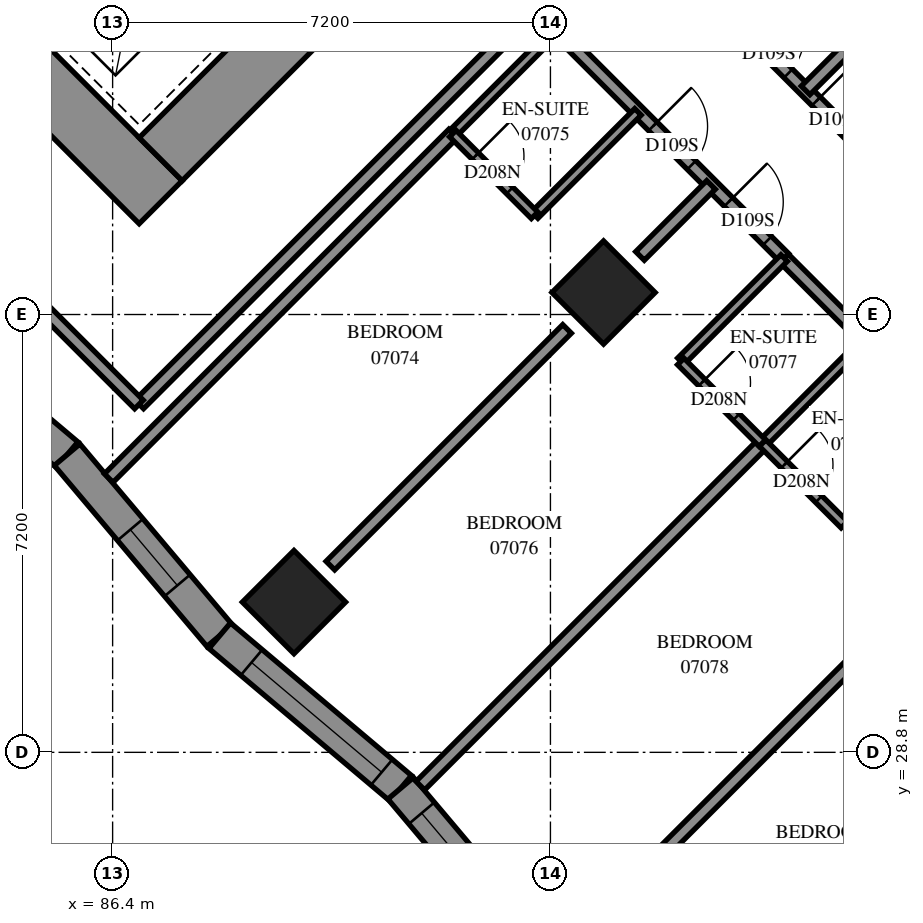
"""IFC4 building model, lengths in metres.
Left out: names, types, materials, properties, quantities, classifications, styles, units other than length and angle.
Written with IfcOpenShell. Run it as: python <this file> out.ifc"""

import sys

from ifc_helpers import new_model, si_unit, direction, frame, frame_2d, origin, origin_2d, place, context, subcontext, project, spatial, polyline, rectangle, outline, extrude, element, fill, save


model = new_model("IFC4")
c1 = context("Model", 3, precision=1e-05, world=origin(), true_north=direction((0.0, 1.0)))
c2 = subcontext(c1, "Body", "Model", "MODEL_VIEW")
j1 = project(units=[si_unit("LENGTHUNIT", "METRE"), si_unit("PLANEANGLEUNIT", "RADIAN")], contexts=[c1])
p1 = place(None, origin())
s1 = spatial("IfcSite", under=j1, at=p1, CompositionType="ELEMENT")
p2 = place(p1, origin())
s2 = spatial("IfcBuilding", under=s1, at=p2, CompositionType="ELEMENT")
p3 = place(p2, frame((0.0, 0.0, 30.4)))
s3 = spatial("IfcBuildingStorey", under=s2, at=p3, CompositionType="ELEMENT", Elevation=30.4)
for number, where, z_axis, x_axis in (
    (1, (94.474, 36.362, 0.0), (0.0, 0.0, 1.0), (0.707, -0.707, 0.0)),
    (2, (89.382, 31.271, 0.0), (0.0, 0.0, 1.0), (0.707, -0.707, 0.0)),
):
    element("IfcColumn", number, at=place(p3, frame(where, z_axis=z_axis, x_axis=x_axis)), inside=s3, PredefinedType="COLUMN", context=c2, shape_type="SweptSolid", body=[
        extrude(rectangle(XDim=1.2, YDim=1.2, at=origin_2d()), origin(), (0.0, 0.0, 1.0), 3.1),
    ])
p4 = place(p3, frame((75.594, 49.443, -0.3), z_axis=(0.0, 0.0, 1.0), x_axis=(0.7071037324, -0.70710983, 0.0)))
e3 = element("IfcWall", 3, at=p4, inside=s3, PredefinedType="SHEAR", context=c2, shape_type="SweptSolid", body=[
    extrude(rectangle(XDim=16.4, YDim=1.0, at=frame_2d((8.2, 0.0))), origin(), (0.0, 0.0, 1.0), 2.7),
])
p5 = place(p3, frame((87.19, 38.554, -0.3), z_axis=(0.0, 0.0, 1.0), x_axis=(0.707103309, 0.7071102534, 0.0)))
e4 = element("IfcWall", 4, at=p5, inside=s3, PredefinedType="SHEAR", context=c2, shape_type="SweptSolid", body=[
    extrude(rectangle(XDim=14.4, YDim=1.0, at=frame_2d((7.2, 0.0))), origin(), (0.0, 0.0, 1.0), 2.7),
])
p6 = place(p5, frame((4.55, 0.0, 0.3)))
e5 = element("IfcOpeningElement", 5, at=p6, cuts=e4, PredefinedType="OPENING", context=c2, shape_type="SweptSolid", body=[
    extrude(rectangle(XDim=1.1, YDim=2.1, at=frame_2d((0.55, 1.05))), frame((0.0, 0.51, 0.0), z_axis=(0.0, -1.0, 0.0), x_axis=(1.0, 0.0, 0.0)), (0.0, 0.0, 1.0), 1.02),
])
p7 = place(p5, frame((11.35, 0.0, 0.3)))
e6 = element("IfcOpeningElement", 6, at=p7, cuts=e4, PredefinedType="OPENING", context=c2, shape_type="SweptSolid", body=[
    extrude(rectangle(XDim=1.1, YDim=2.1, at=frame_2d((0.55, 1.05))), frame((0.0, 0.51, 0.0), z_axis=(0.0, -1.0, 0.0), x_axis=(1.0, 0.0, 0.0)), (0.0, 0.0, 1.0), 1.02),
])
p8 = place(p3, frame((82.676, 36.204, 0.0), z_axis=(0.0, 0.0, 1.0), x_axis=(0.7645046987, -0.6446181549, 0.0)))
e7 = element("IfcWall", 7, at=p8, inside=s3, PredefinedType="SOLIDWALL", context=c2, shape_type="SweptSolid", body=[
    extrude(outline(polyline([(-0.023, -0.275), (3.869, -0.275), (3.916, 0.275), (0.023, 0.275), (-0.023, -0.275)])), origin(), (0.0, 0.0, 1.0), 3.1),
])
p9 = place(p8, frame((1.764, 0.0, 0.5)))
e8 = element("IfcOpeningElement", 8, at=p9, cuts=e7, PredefinedType="OPENING", context=c2, shape_type="SweptSolid", body=[
    extrude(rectangle(XDim=1.2, YDim=2.45, at=frame_2d((0.6, 1.225))), frame((0.0, 0.285, 0.0), z_axis=(0.0, -1.0, 0.0), x_axis=(1.0, 0.0, 0.0)), (0.0, 0.0, 1.0), 0.57),
])
p10 = place(p3, frame((85.652, 33.694, 0.0), z_axis=(0.0, 0.0, 1.0), x_axis=(0.6446181549, -0.7645046987, 0.0)))
e9 = element("IfcWall", 9, at=p10, inside=s3, PredefinedType="SOLIDWALL", context=c2, shape_type="SweptSolid", body=[
    extrude(outline(polyline([(0.023, -0.275), (3.916, -0.275), (3.869, 0.275), (-0.023, 0.275), (0.023, -0.275)])), origin(), (0.0, 0.0, 1.0), 3.1),
])
p11 = place(p10, frame((1.612, 0.0, 0.5)))
e10 = element("IfcOpeningElement", 10, at=p11, cuts=e9, PredefinedType="OPENING", context=c2, shape_type="SweptSolid", body=[
    extrude(rectangle(XDim=1.2, YDim=2.45, at=frame_2d((0.6, 1.225))), frame((0.0, 0.285, 0.0), z_axis=(0.0, -1.0, 0.0), x_axis=(1.0, 0.0, 0.0)), (0.0, 0.0, 1.0), 0.57),
])
p12 = place(p3, frame((88.161, 30.718, 0.0), z_axis=(0.0, 0.0, 1.0), x_axis=(0.7645046987, -0.6446181549, 0.0)))
e11 = element("IfcWall", 11, at=p12, inside=s3, PredefinedType="SOLIDWALL", context=c2, shape_type="SweptSolid", body=[
    extrude(outline(polyline([(-0.023, -0.275), (3.869, -0.275), (3.916, 0.275), (0.023, 0.275), (-0.023, -0.275)])), origin(), (0.0, 0.0, 1.0), 3.1),
])
p13 = place(p12, frame((0.684, 0.0, 0.5)))
e12 = element("IfcOpeningElement", 12, at=p13, cuts=e11, PredefinedType="OPENING", context=c2, shape_type="SweptSolid", body=[
    extrude(rectangle(XDim=2.8, YDim=2.45, at=frame_2d((1.4, 1.225))), frame((0.0, 0.285, 0.0), z_axis=(0.0, -1.0, 0.0), x_axis=(1.0, 0.0, 0.0)), (0.0, 0.0, 1.0), 0.57),
])
p14 = place(p3, frame((91.137, 28.209, 0.0), z_axis=(0.0, 0.0, 1.0), x_axis=(0.6446181549, -0.7645046987, 0.0)))
e13 = element("IfcWall", 13, at=p14, inside=s3, PredefinedType="SOLIDWALL", context=c2, shape_type="SweptSolid", body=[
    extrude(outline(polyline([(0.023, -0.275), (3.916, -0.275), (3.869, 0.275), (-0.023, 0.275), (0.023, -0.275)])), origin(), (0.0, 0.0, 1.0), 3.1),
])
p15 = place(p14, frame((0.535, 0.0, 0.5)))
e14 = element("IfcOpeningElement", 14, at=p15, cuts=e13, PredefinedType="OPENING", context=c2, shape_type="SweptSolid", body=[
    extrude(rectangle(XDim=2.8, YDim=2.45, at=frame_2d((1.4, 1.225))), frame((0.0, 0.285, 0.0), z_axis=(0.0, -1.0, 0.0), x_axis=(1.0, 0.0, 0.0)), (0.0, 0.0, 1.0), 0.57),
])
p16 = place(p3, frame((94.895, 42.581, 0.0), z_axis=(0.0, 0.0, 1.0), x_axis=(0.7071067812, -0.7071067812, 0.0)))
e15 = element("IfcWall", 15, at=p16, inside=s3, PredefinedType="PARTITIONING", context=c2, shape_type="SweptSolid", body=[
    extrude(rectangle(XDim=14.9, YDim=0.2, at=frame_2d((7.45, 0.0))), origin(), (0.0, 0.0, 1.0), 3.1),
])
p17 = place(p16, frame((2.8, 0.0, 0.0)))
e16 = element("IfcOpeningElement", 16, at=p17, cuts=e15, PredefinedType="OPENING", context=c2, shape_type="SweptSolid", body=[
    extrude(rectangle(XDim=0.9, YDim=2.1, at=frame_2d((0.45, 1.05))), frame((0.0, 0.11, 0.0), z_axis=(0.0, -1.0, 0.0), x_axis=(1.0, 0.0, 0.0)), (0.0, 0.0, 1.0), 0.22),
])
p18 = place(p16, frame((4.348, 0.0, 0.0)))
e17 = element("IfcOpeningElement", 17, at=p18, cuts=e15, PredefinedType="OPENING", context=c2, shape_type="SweptSolid", body=[
    extrude(rectangle(XDim=0.9, YDim=2.1, at=frame_2d((0.45, 1.05))), frame((0.0, 0.11, 0.0), z_axis=(0.0, -1.0, 0.0), x_axis=(1.0, 0.0, 0.0)), (0.0, 0.0, 1.0), 0.22),
])
p19 = place(p16, frame((10.073, 0.0, 0.0)))
e18 = element("IfcOpeningElement", 18, at=p19, cuts=e15, PredefinedType="OPENING", context=c2, shape_type="SweptSolid", body=[
    extrude(rectangle(XDim=1.0, YDim=2.1, at=frame_2d((0.5, 1.05))), frame((0.0, 0.11, 0.0), z_axis=(0.0, -1.0, 0.0), x_axis=(1.0, 0.0, 0.0)), (0.0, 0.0, 1.0), 0.22),
])
p20 = place(p3, frame((86.838, 34.522, 0.0), z_axis=(0.0, 0.0, 1.0), x_axis=(0.7072154749, 0.7069980708, 0.0)))
e19 = element("IfcWall", 19, at=p20, inside=s3, PredefinedType="PARTITIONING", context=c2, shape_type="SweptSolid", body=[
    extrude(rectangle(XDim=9.2, YDim=0.2, at=frame_2d((4.6, 0.0))), origin(), (0.0, 0.0, 1.0), 3.1),
])
p21 = place(p3, frame((86.336, 33.31, 0.0), z_axis=(0.0, 0.0, 1.0), x_axis=(0.7069819543, 0.707231586, 0.0)))
e20 = element("IfcWall", 20, at=p21, inside=s3, PredefinedType="PARTITIONING", context=c2, shape_type="SweptSolid", body=[
    extrude(rectangle(XDim=8.012, YDim=0.2, at=frame_2d((4.006, 0.0))), origin(), (0.0, 0.0, 1.0), 3.1),
])
p22 = place(p3, frame((96.538, 23.155, 0.0), z_axis=(0.0, 0.0, 1.0), x_axis=(0.7071130469, 0.7071005154, 0.0)))
e21 = element("IfcWall", 21, at=p22, inside=s3, PredefinedType="PARTITIONING", context=c2, shape_type="SweptSolid", body=[
    extrude(rectangle(XDim=7.98, YDim=0.2, at=frame_2d((3.99, 0.0))), origin(), (0.0, 0.0, 1.0), 3.1),
])
p23 = place(p3, frame((91.461, 28.252, 0.0), z_axis=(0.0, 0.0, 1.0), x_axis=(0.7072323284, 0.7069812117, 0.0)))
e22 = element("IfcWall", 22, at=p23, inside=s3, PredefinedType="PARTITIONING", context=c2, shape_type="SweptSolid", body=[
    extrude(rectangle(XDim=7.964, YDim=0.2, at=frame_2d((3.982, 0.0))), origin(), (0.0, 0.0, 1.0), 3.1),
])
p24 = place(p3, frame((102.531, 31.833, 0.0), z_axis=(0.0, 0.0, 1.0), x_axis=(-0.7070095491, 0.7072039999, 0.0)))
e23 = element("IfcWall", 23, at=p24, inside=s3, PredefinedType="PARTITIONING", context=c2, shape_type="SweptSolid", body=[
    extrude(rectangle(XDim=7.2, YDim=0.2, at=frame_2d((3.6, 0.0))), origin(), (0.0, 0.0, 1.0), 3.1),
])
p25 = place(p24, frame((2.165, 0.0, 0.0)))
e24 = element("IfcOpeningElement", 24, at=p25, cuts=e23, PredefinedType="OPENING", context=c2, shape_type="SweptSolid", body=[
    extrude(rectangle(XDim=0.9, YDim=2.1, at=frame_2d((0.45, 1.05))), frame((0.0, 0.11, 0.0), z_axis=(0.0, -1.0, 0.0), x_axis=(1.0, 0.0, 0.0)), (0.0, 0.0, 1.0), 0.22),
])
p26 = place(p24, frame((0.4, 0.0, 0.0)))
e25 = element("IfcOpeningElement", 25, at=p26, cuts=e23, PredefinedType="OPENING", context=c2, shape_type="SweptSolid", body=[
    extrude(rectangle(XDim=0.9, YDim=2.1, at=frame_2d((0.45, 1.05))), frame((0.0, 0.11, 0.0), z_axis=(0.0, -1.0, 0.0), x_axis=(1.0, 0.0, 0.0)), (0.0, 0.0, 1.0), 0.22),
])
p27 = place(p3, frame((89.981, 31.871, 0.0), z_axis=(0.0, 0.0, 1.0), x_axis=(0.7071067812, 0.7071067812, 0.0)))
e26 = element("IfcWall", 26, at=p27, inside=s3, PredefinedType="PARTITIONING", context=c2, shape_type="SweptSolid", body=[
    extrude(rectangle(XDim=5.504, YDim=0.2, at=frame_2d((2.752, 0.0))), origin(), (0.0, 0.0, 1.0), 3.1),
])
p28 = place(p3, frame((95.073, 26.781, 0.0), z_axis=(0.0, 0.0, 1.0), x_axis=(0.7071067812, 0.7071067812, 0.0)))
e27 = element("IfcWall", 27, at=p28, inside=s3, PredefinedType="PARTITIONING", context=c2, shape_type="SweptSolid", body=[
    extrude(rectangle(XDim=5.501, YDim=0.2, at=frame_2d((2.751, 0.0))), origin(), (0.0, 0.0, 1.0), 3.1),
])
p29 = place(p3, frame((93.699, 40.679, 0.0), z_axis=(0.0, 0.0, 1.0), x_axis=(0.7071067812, -0.7071067812, 0.0)))
e28 = element("IfcWall", 28, at=p29, inside=s3, PredefinedType="PARTITIONING", context=c2, shape_type="SweptSolid", body=[
    extrude(rectangle(XDim=5.301, YDim=0.2, at=frame_2d((2.65, 0.0))), origin(), (0.0, 0.0, 1.0), 3.1),
])
p30 = place(p29, frame((2.242, 0.0, 0.0)))
e29 = element("IfcOpeningElement", 29, at=p30, cuts=e28, PredefinedType="OPENING", context=c2, shape_type="SweptSolid", body=[
    extrude(rectangle(XDim=0.9, YDim=2.1, at=frame_2d((0.45, 1.05))), frame((0.0, 0.11, 0.0), z_axis=(0.0, -1.0, 0.0), x_axis=(1.0, 0.0, 0.0)), (0.0, 0.0, 1.0), 0.22),
])
p31 = place(p29, frame((4.002, 0.0, 0.0)))
e30 = element("IfcOpeningElement", 30, at=p31, cuts=e28, PredefinedType="OPENING", context=c2, shape_type="SweptSolid", body=[
    extrude(rectangle(XDim=0.9, YDim=2.1, at=frame_2d((0.45, 1.05))), frame((0.0, 0.11, 0.0), z_axis=(0.0, -1.0, 0.0), x_axis=(1.0, 0.0, 0.0)), (0.0, 0.0, 1.0), 0.22),
])
p32 = place(p3, frame((84.889, 36.465, 0.0), z_axis=(0.0, 0.0, 1.0), x_axis=(0.7071067812, -0.7071067812, 0.0)))
e31 = element("IfcWall", 31, at=p32, inside=s3, PredefinedType="PARTITIONING", context=c2, shape_type="SweptSolid", body=[
    extrude(rectangle(XDim=2.749, YDim=0.2, at=frame_2d((1.375, 0.0))), origin(), (0.0, 0.0, 1.0), 3.1),
])
for number, where, z_axis, x_axis in (
    (32, (93.341, 37.635, 0.0), (0.0, 0.0, 1.0), (0.707, 0.707, 0.0)),
    (33, (95.745, 35.231, 0.0), (0.0, 0.0, 1.0), (0.707, 0.707, 0.0)),
    (34, (91.997, 38.979, 0.0), (0.0, 0.0, 1.0), (0.707, 0.707, 0.0)),
):
    element("IfcWall", number, at=place(p3, frame(where, z_axis=z_axis, x_axis=x_axis)), inside=s3, PredefinedType="PARTITIONING", context=c2, shape_type="SweptSolid", body=[
        extrude(rectangle(XDim=2.401, YDim=0.15, at=frame_2d((1.201, 0.0))), origin(), (0.0, 0.0, 1.0), 3.1),
    ])
p33 = place(p3, frame((97.092, 33.884, 0.0), z_axis=(0.0, 0.0, 1.0), x_axis=(0.706689978, 0.7075233388, 0.0)))
e35 = element("IfcWall", 35, at=p33, inside=s3, PredefinedType="PARTITIONING", context=c2, shape_type="SweptSolid", body=[
    extrude(rectangle(XDim=2.4, YDim=0.15, at=frame_2d((1.2, 0.0))), origin(), (0.0, 0.0, 1.0), 3.1),
])
p34 = place(p3, frame((98.433, 32.545, 0.0), z_axis=(0.0, 0.0, 1.0), x_axis=(0.7071067812, 0.7071067812, 0.0)))
e36 = element("IfcWall", 36, at=p34, inside=s3, PredefinedType="PARTITIONING", context=c2, shape_type="SweptSolid", body=[
    extrude(rectangle(XDim=2.398, YDim=0.15, at=frame_2d((1.199, 0.0))), origin(), (0.0, 0.0, 1.0), 3.1),
])
p35 = place(p3, frame((95.743, 35.227, 0.0), z_axis=(0.0, 0.0, 1.0), x_axis=(0.7071067812, -0.7071067812, 0.0)))
e37 = element("IfcWall", 37, at=p35, inside=s3, PredefinedType="PARTITIONING", context=c2, shape_type="SweptSolid", body=[
    extrude(rectangle(XDim=1.901, YDim=0.15, at=frame_2d((0.95, 0.0))), origin(), (0.0, 0.0, 1.0), 3.1),
])
p36 = place(p35, frame((0.491, 0.0, 0.0)))
e38 = element("IfcOpeningElement", 38, at=p36, cuts=e37, PredefinedType="OPENING", context=c2, shape_type="SweptSolid", body=[
    extrude(rectangle(XDim=0.8, YDim=2.1, at=frame_2d((0.4, 1.05))), frame((0.0, 0.085, 0.0), z_axis=(0.0, -1.0, 0.0), x_axis=(1.0, 0.0, 0.0)), (0.0, 0.0, 1.0), 0.17),
])
p37 = place(p3, frame((91.995, 38.975, 0.0), z_axis=(0.0, 0.0, 1.0), x_axis=(0.7071067812, -0.7071067812, 0.0)))
e39 = element("IfcWall", 39, at=p37, inside=s3, PredefinedType="PARTITIONING", context=c2, shape_type="SweptSolid", body=[
    extrude(rectangle(XDim=1.901, YDim=0.15, at=frame_2d((0.95, 0.0))), origin(), (0.0, 0.0, 1.0), 3.1),
])
p38 = place(p37, frame((0.523, 0.0, 0.0)))
e40 = element("IfcOpeningElement", 40, at=p38, cuts=e39, PredefinedType="OPENING", context=c2, shape_type="SweptSolid", body=[
    extrude(rectangle(XDim=0.8, YDim=2.1, at=frame_2d((0.4, 1.05))), frame((0.0, 0.085, 0.0), z_axis=(0.0, -1.0, 0.0), x_axis=(1.0, 0.0, 0.0)), (0.0, 0.0, 1.0), 0.17),
])
p39 = place(p3, frame((97.09, 33.886, 0.0), z_axis=(0.0, 0.0, 1.0), x_axis=(0.7076330979, -0.7065800724, 0.0)))
e41 = element("IfcWall", 41, at=p39, inside=s3, PredefinedType="PARTITIONING", context=c2, shape_type="SweptSolid", body=[
    extrude(rectangle(XDim=1.899, YDim=0.15, at=frame_2d((0.95, 0.0))), origin(), (0.0, 0.0, 1.0), 3.1),
])
p40 = place(p39, frame((0.504, 0.0, 0.0)))
e42 = element("IfcOpeningElement", 42, at=p40, cuts=e41, PredefinedType="OPENING", context=c2, shape_type="SweptSolid", body=[
    extrude(rectangle(XDim=0.8, YDim=2.1, at=frame_2d((0.4, 1.05))), frame((0.0, 0.085, 0.0), z_axis=(0.0, -1.0, 0.0), x_axis=(1.0, 0.0, 0.0)), (0.0, 0.0, 1.0), 0.17),
])
for number, where, z_axis, x_axis in (
    (43, (97.796, 39.686, 0.0), (0.0, 0.0, 1.0), (0.707, 0.707, 0.0)),
    (44, (95.073, 36.963, 0.0), (0.0, 0.0, 1.0), (0.707, 0.707, 0.0)),
):
    element("IfcWall", number, at=place(p3, frame(where, z_axis=z_axis, x_axis=x_axis)), inside=s3, PredefinedType="PARTITIONING", context=c2, shape_type="SweptSolid", body=[
        extrude(rectangle(XDim=1.652, YDim=0.2, at=frame_2d((0.826, 0.0))), origin(), (0.0, 0.0, 1.0), 3.1),
    ])
p41 = place(p11, origin())
e45 = element("IfcWindow", 45, at=p41, inside=s3, PartitioningType="SINGLE_PANEL", PredefinedType="WINDOW", context=c2, shape_type="SweptSolid", body=[
    extrude(rectangle(XDim=1.2, YDim=2.45, at=frame_2d((0.6, 1.225))), frame((0.0, 0.155, 0.0), z_axis=(0.0, -1.0, 0.0), x_axis=(1.0, 0.0, 0.0)), (0.0, 0.0, 1.0), 0.06),
])
fill(e10, e45)
p42 = place(p13, origin())
e46 = element("IfcWindow", 46, at=p42, inside=s3, PartitioningType="SINGLE_PANEL", PredefinedType="WINDOW", context=c2, shape_type="SweptSolid", body=[
    extrude(rectangle(XDim=2.8, YDim=2.45, at=frame_2d((1.4, 1.225))), frame((0.0, 0.155, 0.0), z_axis=(0.0, -1.0, 0.0), x_axis=(1.0, 0.0, 0.0)), (0.0, 0.0, 1.0), 0.06),
])
fill(e12, e46)
p43 = place(p15, origin())
e47 = element("IfcWindow", 47, at=p43, inside=s3, PartitioningType="SINGLE_PANEL", PredefinedType="WINDOW", context=c2, shape_type="SweptSolid", body=[
    extrude(rectangle(XDim=2.8, YDim=2.45, at=frame_2d((1.4, 1.225))), frame((0.0, 0.155, 0.0), z_axis=(0.0, -1.0, 0.0), x_axis=(1.0, 0.0, 0.0)), (0.0, 0.0, 1.0), 0.06),
])
fill(e14, e47)
p44 = place(p17, origin())
e48 = element("IfcDoor", 48, at=p44, inside=s3, OperationType="SINGLE_SWING_RIGHT", PredefinedType="DOOR", context=c2, shape_type="SweptSolid", body=[
    extrude(rectangle(XDim=0.9, YDim=2.1, at=frame_2d((0.45, 1.05))), frame((0.0, 0.025, 0.0), z_axis=(0.0, -1.0, 0.0), x_axis=(1.0, 0.0, 0.0)), (0.0, 0.0, 1.0), 0.05),
])
fill(e16, e48)
p45 = place(p18, origin())
e49 = element("IfcDoor", 49, at=p45, inside=s3, OperationType="SINGLE_SWING_LEFT", PredefinedType="DOOR", context=c2, shape_type="SweptSolid", body=[
    extrude(rectangle(XDim=0.9, YDim=2.1, at=frame_2d((0.45, 1.05))), frame((0.0, 0.025, 0.0), z_axis=(0.0, -1.0, 0.0), x_axis=(1.0, 0.0, 0.0)), (0.0, 0.0, 1.0), 0.05),
])
fill(e17, e49)
p46 = place(p30, origin())
e50 = element("IfcDoor", 50, at=p46, inside=s3, OperationType="SINGLE_SWING_LEFT", PredefinedType="DOOR", context=c2, shape_type="SweptSolid", body=[
    extrude(rectangle(XDim=0.9, YDim=2.1, at=frame_2d((0.45, 1.05))), frame((0.0, 0.025, 0.0), z_axis=(0.0, -1.0, 0.0), x_axis=(1.0, 0.0, 0.0)), (0.0, 0.0, 1.0), 0.05),
])
fill(e29, e50)
p47 = place(p38, origin())
e51 = element("IfcDoor", 51, at=p47, inside=s3, OperationType="SINGLE_SWING_RIGHT", PredefinedType="DOOR", context=c2, shape_type="SweptSolid", body=[
    extrude(rectangle(XDim=0.8, YDim=2.1, at=frame_2d((0.4, 1.05))), frame((0.0, 0.025, 0.0), z_axis=(0.0, -1.0, 0.0), x_axis=(1.0, 0.0, 0.0)), (0.0, 0.0, 1.0), 0.05),
])
fill(e40, e51)
p48 = place(p31, origin())
e52 = element("IfcDoor", 52, at=p48, inside=s3, OperationType="SINGLE_SWING_RIGHT", PredefinedType="DOOR", context=c2, shape_type="SweptSolid", body=[
    extrude(rectangle(XDim=0.9, YDim=2.1, at=frame_2d((0.45, 1.05))), frame((0.0, 0.025, 0.0), z_axis=(0.0, -1.0, 0.0), x_axis=(1.0, 0.0, 0.0)), (0.0, 0.0, 1.0), 0.05),
])
fill(e30, e52)
p49 = place(p36, origin())
e53 = element("IfcDoor", 53, at=p49, inside=s3, OperationType="SINGLE_SWING_RIGHT", PredefinedType="DOOR", context=c2, shape_type="SweptSolid", body=[
    extrude(rectangle(XDim=0.8, YDim=2.1, at=frame_2d((0.4, 1.05))), frame((0.0, 0.025, 0.0), z_axis=(0.0, -1.0, 0.0), x_axis=(1.0, 0.0, 0.0)), (0.0, 0.0, 1.0), 0.05),
])
fill(e38, e53)
p50 = place(p40, origin())
e54 = element("IfcDoor", 54, at=p50, inside=s3, OperationType="SINGLE_SWING_RIGHT", PredefinedType="DOOR", context=c2, shape_type="SweptSolid", body=[
    extrude(rectangle(XDim=0.8, YDim=2.1, at=frame_2d((0.4, 1.05))), frame((0.0, 0.025, 0.0), z_axis=(0.0, -1.0, 0.0), x_axis=(1.0, 0.0, 0.0)), (0.0, 0.0, 1.0), 0.05),
])
fill(e42, e54)
save(model, sys.argv[1])
